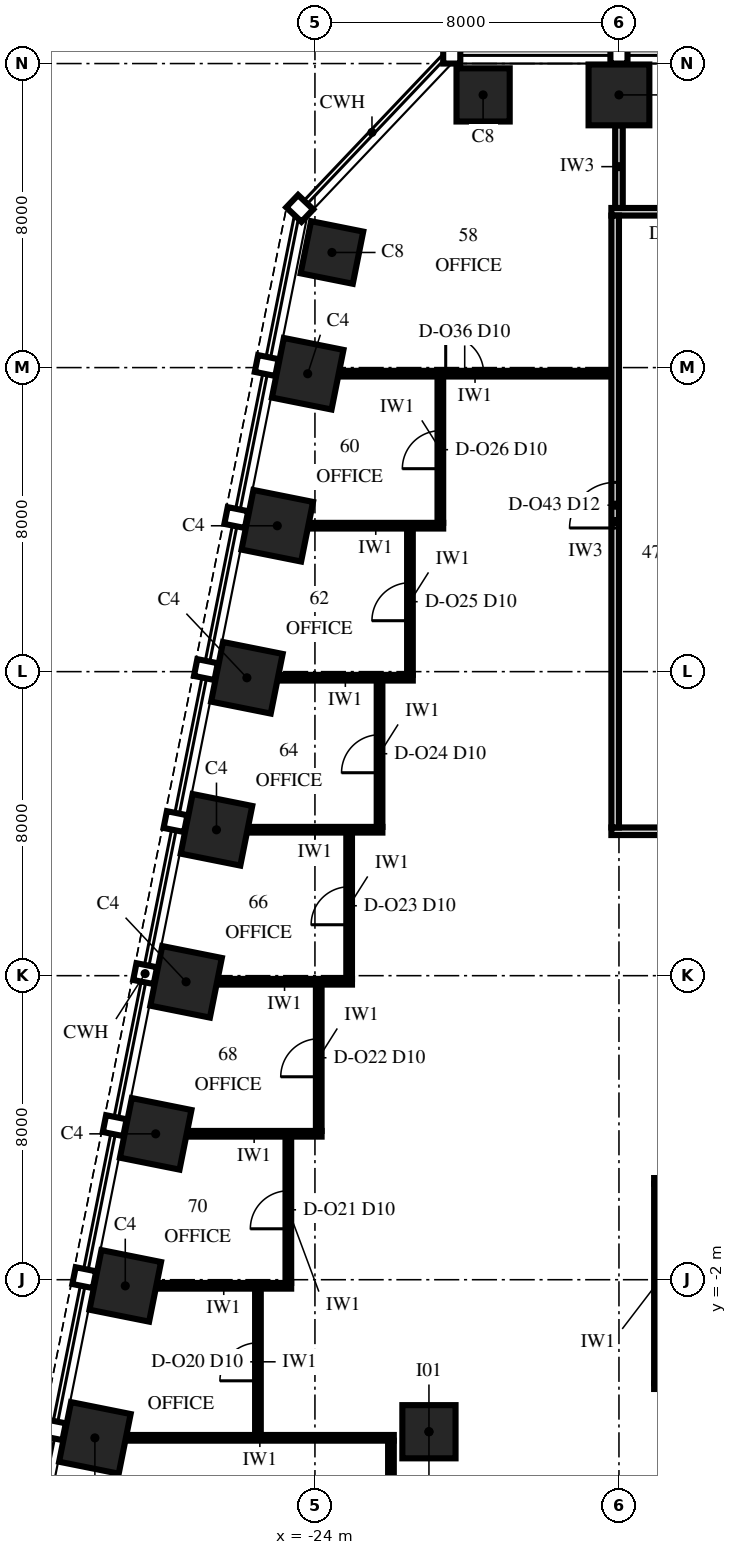
"""IFC4 building model, lengths in metres.
Left out: names, types, materials, properties, quantities, classifications, styles, units other than length and angle.
Written with IfcOpenShell. Run it as: python <this file> out.ifc"""

import sys

from ifc_helpers import new_model, si_unit, direction, frame, frame_2d, origin, origin_2d, place, context, subcontext, project, spatial, rectangle, extrude, element, fill, save


model = new_model("IFC4")
c1 = context("Model", 3, precision=1e-05, world=origin(), true_north=direction((0.0, 1.0)))
c2 = subcontext(c1, "Body", "Model", "MODEL_VIEW")
j1 = project(units=[si_unit("LENGTHUNIT", "METRE"), si_unit("PLANEANGLEUNIT", "RADIAN")], contexts=[c1])
p1 = place(None, origin())
s1 = spatial("IfcSite", under=j1, at=p1, CompositionType="ELEMENT")
p2 = place(p1, origin())
s2 = spatial("IfcBuilding", under=s1, at=p2, CompositionType="ELEMENT")
p3 = place(p2, frame((0.0, 0.0, 202.0)))
s3 = spatial("IfcBuildingStorey", under=s2, at=p3, CompositionType="ELEMENT", Elevation=202.0)
p4 = place(p3, frame((-16.0, 29.175, 0.0), z_axis=(0.0, 0.0, 1.0), x_axis=(-1.0, 0.0, 0.0)))
e1 = element("IfcColumn", 1, at=p4, inside=s3, PredefinedType="COLUMN", context=c2, shape_type="SweptSolid", body=[
    extrude(rectangle(XDim=1.6, YDim=1.6, at=origin_2d()), origin(), (0.0, 0.0, 1.0), 4.0),
])
for number, where, z_axis, x_axis in (
    (2, (-19.575, 29.175, 0.0), (0.0, 0.0, 1.0), (-1.0, 0.0, 0.0)),
    (3, (-23.553, 25.029, 0.0), (0.0, 0.0, 1.0), (-0.196, -0.981, 0.0)),
):
    element("IfcColumn", number, at=place(p3, frame(where, z_axis=z_axis, x_axis=x_axis)), inside=s3, PredefinedType="COLUMN", context=c2, shape_type="SweptSolid", body=[
        extrude(rectangle(XDim=1.4, YDim=1.4, at=origin_2d()), origin(), (0.0, 0.0, 1.0), 4.0),
    ])
for number, where, z_axis, x_axis in (
    (4, (-24.191, 21.838, 0.0), (0.0, 0.0, 1.0), (-0.196, -0.981, 0.0)),
    (5, (-24.991, 17.838, 0.0), (0.0, 0.0, 1.0), (-0.196, -0.981, 0.0)),
    (6, (-25.791, 13.838, 0.0), (0.0, 0.0, 1.0), (-0.196, -0.981, 0.0)),
    (7, (-26.591, 9.838, 0.0), (0.0, 0.0, 1.0), (-0.196, -0.981, 0.0)),
    (8, (-27.391, 5.838, 0.0), (0.0, 0.0, 1.0), (-0.196, -0.981, 0.0)),
    (9, (-28.191, 1.838, 0.0), (0.0, 0.0, 1.0), (-0.196, -0.981, 0.0)),
    (10, (-28.991, -2.162, 0.0), (0.0, 0.0, 1.0), (-0.196, -0.981, 0.0)),
    (11, (-29.791, -6.162, 0.0), (0.0, 0.0, 1.0), (-0.196, -0.981, 0.0)),
):
    element("IfcColumn", number, at=place(p3, frame(where, z_axis=z_axis, x_axis=x_axis)), inside=s3, PredefinedType="COLUMN", context=c2, shape_type="SweptSolid", body=[
        extrude(rectangle(XDim=1.6, YDim=1.6, at=origin_2d()), origin(), (0.0, 0.0, 1.0), 4.0),
    ])
p5 = place(p3, frame((-21.0, -6.0, 0.0), z_axis=(0.0, 0.0, 1.0), x_axis=(1.0, 0.0, 0.0)))
e12 = element("IfcColumn", 12, at=p5, inside=s3, PredefinedType="COLUMN", context=c2, shape_type="SweptSolid", body=[
    extrude(rectangle(XDim=1.4, YDim=1.4, at=origin_2d()), origin(), (0.0, 0.0, 1.0), 4.0),
])
p6 = place(p3, frame((-28.975, -6.16, 0.0), z_axis=(0.0, 0.0, 1.0), x_axis=(1.0, 0.0, 0.0)))
e13 = element("IfcWall", 13, at=p6, inside=s3, PredefinedType="PARTITIONING", context=c2, shape_type="SweptSolid", body=[
    extrude(rectangle(XDim=7.05, YDim=0.15, at=frame_2d((3.525, 0.0))), origin(), (0.0, 0.0, 1.0), 2.842),
])
p7 = place(p3, frame((-15.075, -4.8, 0.0), z_axis=(0.0, 0.0, 1.0), x_axis=(1.0, 0.0, 0.0)))
e14 = element("IfcWall", 14, at=p7, inside=s3, PredefinedType="PARTITIONING", context=c2, shape_type="SweptSolid", body=[
    extrude(rectangle(XDim=3.075, YDim=0.15, at=frame_2d((1.538, 0.0))), origin(), (0.0, 0.0, 1.0), 3.25),
])
p8 = place(p3, frame((-28.175, -2.16, 0.0), z_axis=(0.0, 0.0, 1.0), x_axis=(1.0, 0.0, 0.0)))
e15 = element("IfcWall", 15, at=p8, inside=s3, PredefinedType="PARTITIONING", context=c2, shape_type="SweptSolid", body=[
    extrude(rectangle(XDim=3.55, YDim=0.15, at=frame_2d((1.775, 0.0))), origin(), (0.0, 0.0, 1.0), 3.25),
])
p9 = place(p3, frame((-15.075, 0.6, 0.0), z_axis=(0.0, 0.0, 1.0), x_axis=(1.0, 0.0, 0.0)))
e16 = element("IfcWall", 16, at=p9, inside=s3, PredefinedType="PARTITIONING", context=c2, shape_type="SweptSolid", body=[
    extrude(rectangle(XDim=3.075, YDim=0.15, at=frame_2d((1.538, 0.0))), origin(), (0.0, 0.0, 1.0), 3.25),
])
p10 = place(p9, frame((1.075, 0.0, 0.0)))
e17 = element("IfcOpeningElement", 17, at=p10, cuts=e16, PredefinedType="OPENING", context=c2, shape_type="SweptSolid", body=[
    extrude(rectangle(XDim=1.0, YDim=2.3, at=frame_2d((0.5, 1.15))), frame((0.0, 0.09, 0.0), z_axis=(0.0, -1.0, 0.0), x_axis=(1.0, 0.0, 0.0)), (0.0, 0.0, 1.0), 0.18),
])
p11 = place(p3, frame((-27.375, 1.84, 0.0), z_axis=(0.0, 0.0, 1.0), x_axis=(1.0, 0.0, 0.0)))
e18 = element("IfcWall", 18, at=p11, inside=s3, PredefinedType="PARTITIONING", context=c2, shape_type="SweptSolid", body=[
    extrude(rectangle(XDim=3.55, YDim=0.15, at=frame_2d((1.775, 0.0))), origin(), (0.0, 0.0, 1.0), 3.25),
])
p12 = place(p3, frame((-26.575, 5.84, 0.0), z_axis=(0.0, 0.0, 1.0), x_axis=(1.0, 0.0, 0.0)))
e19 = element("IfcWall", 19, at=p12, inside=s3, PredefinedType="PARTITIONING", context=c2, shape_type="SweptSolid", body=[
    extrude(rectangle(XDim=3.55, YDim=0.15, at=frame_2d((1.775, 0.0))), origin(), (0.0, 0.0, 1.0), 2.842),
])
p13 = place(p3, frame((-16.2, 9.8, 0.0), z_axis=(0.0, 0.0, 1.0), x_axis=(1.0, 0.0, 0.0)))
e20 = element("IfcWall", 20, at=p13, inside=s3, PredefinedType="PARTITIONING", context=c2, shape_type="SweptSolid", body=[
    extrude(rectangle(XDim=2.02, YDim=0.2, at=frame_2d((1.01, 0.0))), origin(), (0.0, 0.0, 1.0), 3.85),
])
for number, where, z_axis, x_axis in (
    (21, (-25.775, 9.84, 0.0), (0.0, 0.0, 1.0), (1.0, 0.0, 0.0)),
    (22, (-24.975, 13.84, 0.0), (0.0, 0.0, 1.0), (1.0, 0.0, 0.0)),
    (23, (-24.175, 17.84, 0.0), (0.0, 0.0, 1.0), (1.0, 0.0, 0.0)),
):
    element("IfcWall", number, at=place(p3, frame(where, z_axis=z_axis, x_axis=x_axis)), inside=s3, PredefinedType="PARTITIONING", context=c2, shape_type="SweptSolid", body=[
        extrude(rectangle(XDim=3.55, YDim=0.15, at=frame_2d((1.775, 0.0))), origin(), (0.0, 0.0, 1.0), 3.25),
    ])
p14 = place(p3, frame((-23.375, 21.84, 0.0), z_axis=(0.0, 0.0, 1.0), x_axis=(1.0, 0.0, 0.0)))
e24 = element("IfcWall", 24, at=p14, inside=s3, PredefinedType="PARTITIONING", context=c2, shape_type="SweptSolid", body=[
    extrude(rectangle(XDim=7.175, YDim=0.15, at=frame_2d((3.587, 0.0))), origin(), (0.0, 0.0, 1.0), 3.25),
])
p15 = place(p14, frame((2.816, 0.0, 0.0)))
e25 = element("IfcOpeningElement", 25, at=p15, cuts=e24, PredefinedType="OPENING", context=c2, shape_type="SweptSolid", body=[
    extrude(rectangle(XDim=1.0, YDim=2.3, at=frame_2d((0.5, 1.15))), frame((0.0, 0.09, 0.0), z_axis=(0.0, -1.0, 0.0), x_axis=(1.0, 0.0, 0.0)), (0.0, 0.0, 1.0), 0.18),
])
p16 = place(p3, frame((-16.2, 26.1, 0.0), z_axis=(0.0, 0.0, 1.0), x_axis=(1.0, 0.0, 0.0)))
e26 = element("IfcWall", 26, at=p16, inside=s3, PredefinedType="PARTITIONING", context=c2, shape_type="SweptSolid", body=[
    extrude(rectangle(XDim=32.1, YDim=0.2, at=frame_2d((16.05, 0.0))), origin(), (0.0, 0.0, 1.0), 3.4),
])
p17 = place(p16, frame((1.6, 0.0, 0.0)))
e27 = element("IfcOpeningElement", 27, at=p17, cuts=e26, PredefinedType="OPENING", context=c2, shape_type="SweptSolid", body=[
    extrude(rectangle(XDim=1.2, YDim=2.4, at=frame_2d((0.6, 1.2))), frame((0.0, 0.115, 0.0), z_axis=(0.0, -1.0, 0.0), x_axis=(1.0, 0.0, 0.0)), (0.0, 0.0, 1.0), 0.23),
])
p18 = place(p16, frame((5.6, 0.0, 0.0)))
e28 = element("IfcOpeningElement", 28, at=p18, cuts=e26, PredefinedType="OPENING", context=c2, shape_type="SweptSolid", body=[
    extrude(rectangle(XDim=1.2, YDim=2.4, at=frame_2d((0.6, 1.2))), frame((0.0, 0.115, 0.0), z_axis=(0.0, -1.0, 0.0), x_axis=(1.0, 0.0, 0.0)), (0.0, 0.0, 1.0), 0.23),
])
p19 = place(p16, frame((9.6, 0.0, 0.0)))
e29 = element("IfcOpeningElement", 29, at=p19, cuts=e26, PredefinedType="OPENING", context=c2, shape_type="SweptSolid", body=[
    extrude(rectangle(XDim=1.2, YDim=2.4, at=frame_2d((0.6, 1.2))), frame((0.0, 0.115, 0.0), z_axis=(0.0, -1.0, 0.0), x_axis=(1.0, 0.0, 0.0)), (0.0, 0.0, 1.0), 0.23),
])
p20 = place(p16, frame((13.6, 0.0, 0.0)))
e30 = element("IfcOpeningElement", 30, at=p20, cuts=e26, PredefinedType="OPENING", context=c2, shape_type="SweptSolid", body=[
    extrude(rectangle(XDim=1.2, YDim=2.4, at=frame_2d((0.6, 1.2))), frame((0.0, 0.115, 0.0), z_axis=(0.0, -1.0, 0.0), x_axis=(1.0, 0.0, 0.0)), (0.0, 0.0, 1.0), 0.23),
])
p21 = place(p16, frame((17.6, 0.0, 0.0)))
e31 = element("IfcOpeningElement", 31, at=p21, cuts=e26, PredefinedType="OPENING", context=c2, shape_type="SweptSolid", body=[
    extrude(rectangle(XDim=1.2, YDim=2.4, at=frame_2d((0.6, 1.2))), frame((0.0, 0.115, 0.0), z_axis=(0.0, -1.0, 0.0), x_axis=(1.0, 0.0, 0.0)), (0.0, 0.0, 1.0), 0.23),
])
p22 = place(p16, frame((21.6, 0.0, 0.0)))
e32 = element("IfcOpeningElement", 32, at=p22, cuts=e26, PredefinedType="OPENING", context=c2, shape_type="SweptSolid", body=[
    extrude(rectangle(XDim=1.2, YDim=2.4, at=frame_2d((0.6, 1.2))), frame((0.0, 0.115, 0.0), z_axis=(0.0, -1.0, 0.0), x_axis=(1.0, 0.0, 0.0)), (0.0, 0.0, 1.0), 0.23),
])
p23 = place(p16, frame((25.6, 0.0, 0.0)))
e33 = element("IfcOpeningElement", 33, at=p23, cuts=e26, PredefinedType="OPENING", context=c2, shape_type="SweptSolid", body=[
    extrude(rectangle(XDim=1.2, YDim=2.4, at=frame_2d((0.6, 1.2))), frame((0.0, 0.115, 0.0), z_axis=(0.0, -1.0, 0.0), x_axis=(1.0, 0.0, 0.0)), (0.0, 0.0, 1.0), 0.23),
])
p24 = place(p16, frame((29.6, 0.0, 0.0)))
e34 = element("IfcOpeningElement", 34, at=p24, cuts=e26, PredefinedType="OPENING", context=c2, shape_type="SweptSolid", body=[
    extrude(rectangle(XDim=1.2, YDim=2.4, at=frame_2d((0.6, 1.2))), frame((0.0, 0.115, 0.0), z_axis=(0.0, -1.0, 0.0), x_axis=(1.0, 0.0, 0.0)), (0.0, 0.0, 1.0), 0.23),
])
p25 = place(p3, frame((-25.5, -6.085, 0.0), z_axis=(0.0, 0.0, 1.0), x_axis=(0.0, 1.0, 0.0)))
e35 = element("IfcWall", 35, at=p25, inside=s3, PredefinedType="PARTITIONING", context=c2, shape_type="SweptSolid", body=[
    extrude(rectangle(XDim=3.85, YDim=0.15, at=frame_2d((1.925, 0.0))), origin(), (0.0, 0.0, 1.0), 2.842),
])
p26 = place(p25, frame((1.425, 0.0, 0.0)))
e36 = element("IfcOpeningElement", 36, at=p26, cuts=e35, PredefinedType="OPENING", context=c2, shape_type="SweptSolid", body=[
    extrude(rectangle(XDim=1.0, YDim=2.3, at=frame_2d((0.5, 1.15))), frame((0.0, 0.09, 0.0), z_axis=(0.0, -1.0, 0.0), x_axis=(1.0, 0.0, 0.0)), (0.0, 0.0, 1.0), 0.18),
])
p27 = place(p3, frame((-24.7, -2.085, 0.0), z_axis=(0.0, 0.0, 1.0), x_axis=(0.0, 1.0, 0.0)))
e37 = element("IfcWall", 37, at=p27, inside=s3, PredefinedType="PARTITIONING", context=c2, shape_type="SweptSolid", body=[
    extrude(rectangle(XDim=3.85, YDim=0.15, at=frame_2d((1.925, 0.0))), origin(), (0.0, 0.0, 1.0), 3.85),
])
p28 = place(p27, frame((1.425, 0.0, 0.0)))
e38 = element("IfcOpeningElement", 38, at=p28, cuts=e37, PredefinedType="OPENING", context=c2, shape_type="SweptSolid", body=[
    extrude(rectangle(XDim=1.0, YDim=2.3, at=frame_2d((0.5, 1.15))), frame((0.0, 0.09, 0.0), z_axis=(0.0, -1.0, 0.0), x_axis=(1.0, 0.0, 0.0)), (0.0, 0.0, 1.0), 0.18),
])
p29 = place(p3, frame((-23.9, 1.915, 0.0), z_axis=(0.0, 0.0, 1.0), x_axis=(0.0, 1.0, 0.0)))
e39 = element("IfcWall", 39, at=p29, inside=s3, PredefinedType="PARTITIONING", context=c2, shape_type="SweptSolid", body=[
    extrude(rectangle(XDim=3.85, YDim=0.15, at=frame_2d((1.925, 0.0))), origin(), (0.0, 0.0, 1.0), 3.85),
])
p30 = place(p29, frame((1.425, 0.0, 0.0)))
e40 = element("IfcOpeningElement", 40, at=p30, cuts=e39, PredefinedType="OPENING", context=c2, shape_type="SweptSolid", body=[
    extrude(rectangle(XDim=1.0, YDim=2.3, at=frame_2d((0.5, 1.15))), frame((0.0, 0.09, 0.0), z_axis=(0.0, -1.0, 0.0), x_axis=(1.0, 0.0, 0.0)), (0.0, 0.0, 1.0), 0.18),
])
p31 = place(p3, frame((-23.1, 5.915, 0.0), z_axis=(0.0, 0.0, 1.0), x_axis=(0.0, 1.0, 0.0)))
e41 = element("IfcWall", 41, at=p31, inside=s3, PredefinedType="PARTITIONING", context=c2, shape_type="SweptSolid", body=[
    extrude(rectangle(XDim=3.85, YDim=0.15, at=frame_2d((1.925, 0.0))), origin(), (0.0, 0.0, 1.0), 2.842),
])
p32 = place(p31, frame((1.425, 0.0, 0.0)))
e42 = element("IfcOpeningElement", 42, at=p32, cuts=e41, PredefinedType="OPENING", context=c2, shape_type="SweptSolid", body=[
    extrude(rectangle(XDim=1.0, YDim=2.3, at=frame_2d((0.5, 1.15))), frame((0.0, 0.09, 0.0), z_axis=(0.0, -1.0, 0.0), x_axis=(1.0, 0.0, 0.0)), (0.0, 0.0, 1.0), 0.18),
])
p33 = place(p3, frame((-22.3, 9.915, 0.0), z_axis=(0.0, 0.0, 1.0), x_axis=(0.0, 1.0, 0.0)))
e43 = element("IfcWall", 43, at=p33, inside=s3, PredefinedType="PARTITIONING", context=c2, shape_type="SweptSolid", body=[
    extrude(rectangle(XDim=3.85, YDim=0.15, at=frame_2d((1.925, 0.0))), origin(), (0.0, 0.0, 1.0), 3.85),
])
p34 = place(p33, frame((1.425, 0.0, 0.0)))
e44 = element("IfcOpeningElement", 44, at=p34, cuts=e43, PredefinedType="OPENING", context=c2, shape_type="SweptSolid", body=[
    extrude(rectangle(XDim=1.0, YDim=2.3, at=frame_2d((0.5, 1.15))), frame((0.0, 0.09, 0.0), z_axis=(0.0, -1.0, 0.0), x_axis=(1.0, 0.0, 0.0)), (0.0, 0.0, 1.0), 0.18),
])
p35 = place(p3, frame((-22.0, -16.375, 0.0), z_axis=(0.0, 0.0, 1.0), x_axis=(0.0, 1.0, 0.0)))
e45 = element("IfcWall", 45, at=p35, inside=s3, PredefinedType="PARTITIONING", context=c2, shape_type="SweptSolid", body=[
    extrude(rectangle(XDim=10.14, YDim=0.15, at=frame_2d((5.07, 0.0))), origin(), (0.0, 0.0, 1.0), 3.25),
])
p36 = place(p35, frame((5.975, 0.0, 0.0)))
e46 = element("IfcOpeningElement", 46, at=p36, cuts=e45, PredefinedType="OPENING", context=c2, shape_type="SweptSolid", body=[
    extrude(rectangle(XDim=1.8, YDim=2.4, at=frame_2d((0.9, 1.2))), frame((0.0, 0.09, 0.0), z_axis=(0.0, -1.0, 0.0), x_axis=(1.0, 0.0, 0.0)), (0.0, 0.0, 1.0), 0.18),
])
p37 = place(p3, frame((-21.5, 13.915, 0.0), z_axis=(0.0, 0.0, 1.0), x_axis=(0.0, 1.0, 0.0)))
e47 = element("IfcWall", 47, at=p37, inside=s3, PredefinedType="PARTITIONING", context=c2, shape_type="SweptSolid", body=[
    extrude(rectangle(XDim=3.85, YDim=0.15, at=frame_2d((1.925, 0.0))), origin(), (0.0, 0.0, 1.0), 3.25),
])
p38 = place(p37, frame((1.425, 0.0, 0.0)))
e48 = element("IfcOpeningElement", 48, at=p38, cuts=e47, PredefinedType="OPENING", context=c2, shape_type="SweptSolid", body=[
    extrude(rectangle(XDim=1.0, YDim=2.3, at=frame_2d((0.5, 1.15))), frame((0.0, 0.09, 0.0), z_axis=(0.0, -1.0, 0.0), x_axis=(1.0, 0.0, 0.0)), (0.0, 0.0, 1.0), 0.18),
])
p39 = place(p3, frame((-20.7, 17.915, 0.0), z_axis=(0.0, 0.0, 1.0), x_axis=(0.0, 1.0, 0.0)))
e49 = element("IfcWall", 49, at=p39, inside=s3, PredefinedType="PARTITIONING", context=c2, shape_type="SweptSolid", body=[
    extrude(rectangle(XDim=3.85, YDim=0.15, at=frame_2d((1.925, 0.0))), origin(), (0.0, 0.0, 1.0), 3.25),
])
p40 = place(p39, frame((1.425, 0.0, 0.0)))
e50 = element("IfcOpeningElement", 50, at=p40, cuts=e49, PredefinedType="OPENING", context=c2, shape_type="SweptSolid", body=[
    extrude(rectangle(XDim=1.0, YDim=2.3, at=frame_2d((0.5, 1.15))), frame((0.0, 0.09, 0.0), z_axis=(0.0, -1.0, 0.0), x_axis=(1.0, 0.0, 0.0)), (0.0, 0.0, 1.0), 0.18),
])
p41 = place(p3, frame((-16.1, 9.9, 0.0), z_axis=(0.0, 0.0, 1.0), x_axis=(0.0, 1.0, 0.0)))
e51 = element("IfcWall", 51, at=p41, inside=s3, PredefinedType="PARTITIONING", context=c2, shape_type="SweptSolid", body=[
    extrude(rectangle(XDim=16.1, YDim=0.2, at=frame_2d((8.05, 0.0))), origin(), (0.0, 0.0, 1.0), 3.25),
])
p42 = place(p41, frame((7.88, 0.0, 0.0)))
e52 = element("IfcOpeningElement", 52, at=p42, cuts=e51, PredefinedType="OPENING", context=c2, shape_type="SweptSolid", body=[
    extrude(rectangle(XDim=1.2, YDim=2.4, at=frame_2d((0.6, 1.2))), frame((0.0, 0.115, 0.0), z_axis=(0.0, -1.0, 0.0), x_axis=(1.0, 0.0, 0.0)), (0.0, 0.0, 1.0), 0.23),
])
p43 = place(p3, frame((-16.0, 26.2, 0.0), z_axis=(0.0, 0.0, 1.0), x_axis=(0.0, 1.0, 0.0)))
e53 = element("IfcWall", 53, at=p43, inside=s3, PredefinedType="PARTITIONING", context=c2, shape_type="SweptSolid", body=[
    extrude(rectangle(XDim=2.175, YDim=0.2, at=frame_2d((1.087, 0.0))), origin(), (0.0, 0.0, 1.0), 3.4),
])
p44 = place(p3, frame((-15.0, -4.725, 0.0), z_axis=(0.0, 0.0, 1.0), x_axis=(0.0, 1.0, 0.0)))
e54 = element("IfcWall", 54, at=p44, inside=s3, PredefinedType="PARTITIONING", context=c2, shape_type="SweptSolid", body=[
    extrude(rectangle(XDim=5.25, YDim=0.15, at=frame_2d((2.625, 0.0))), origin(), (0.0, 0.0, 1.0), 3.85),
])
p45 = place(p26, origin())
e55 = element("IfcDoor", 55, at=p45, inside=s3, OperationType="SINGLE_SWING_LEFT", PredefinedType="DOOR", context=c2, shape_type="SweptSolid", body=[
    extrude(rectangle(XDim=1.0, YDim=2.3, at=frame_2d((0.5, 1.15))), frame((0.0, 0.075, 0.0), z_axis=(0.0, -1.0, 0.0), x_axis=(1.0, 0.0, 0.0)), (0.0, 0.0, 1.0), 0.149),
])
fill(e36, e55)
p46 = place(p28, origin())
e56 = element("IfcDoor", 56, at=p46, inside=s3, OperationType="SINGLE_SWING_LEFT", PredefinedType="DOOR", context=c2, shape_type="SweptSolid", body=[
    extrude(rectangle(XDim=1.0, YDim=2.3, at=frame_2d((0.5, 1.15))), frame((0.0, 0.075, 0.0), z_axis=(0.0, -1.0, 0.0), x_axis=(1.0, 0.0, 0.0)), (0.0, 0.0, 1.0), 0.149),
])
fill(e38, e56)
p47 = place(p30, origin())
e57 = element("IfcDoor", 57, at=p47, inside=s3, OperationType="SINGLE_SWING_LEFT", PredefinedType="DOOR", context=c2, shape_type="SweptSolid", body=[
    extrude(rectangle(XDim=1.0, YDim=2.3, at=frame_2d((0.5, 1.15))), frame((0.0, 0.075, 0.0), z_axis=(0.0, -1.0, 0.0), x_axis=(1.0, 0.0, 0.0)), (0.0, 0.0, 1.0), 0.149),
])
fill(e40, e57)
p48 = place(p32, origin())
e58 = element("IfcDoor", 58, at=p48, inside=s3, OperationType="SINGLE_SWING_LEFT", PredefinedType="DOOR", context=c2, shape_type="SweptSolid", body=[
    extrude(rectangle(XDim=1.0, YDim=2.3, at=frame_2d((0.5, 1.15))), frame((0.0, 0.075, 0.0), z_axis=(0.0, -1.0, 0.0), x_axis=(1.0, 0.0, 0.0)), (0.0, 0.0, 1.0), 0.149),
])
fill(e42, e58)
p49 = place(p34, origin())
e59 = element("IfcDoor", 59, at=p49, inside=s3, OperationType="SINGLE_SWING_LEFT", PredefinedType="DOOR", context=c2, shape_type="SweptSolid", body=[
    extrude(rectangle(XDim=1.0, YDim=2.3, at=frame_2d((0.5, 1.15))), frame((0.0, 0.075, 0.0), z_axis=(0.0, -1.0, 0.0), x_axis=(1.0, 0.0, 0.0)), (0.0, 0.0, 1.0), 0.149),
])
fill(e44, e59)
p50 = place(p38, origin())
e60 = element("IfcDoor", 60, at=p50, inside=s3, OperationType="SINGLE_SWING_LEFT", PredefinedType="DOOR", context=c2, shape_type="SweptSolid", body=[
    extrude(rectangle(XDim=1.0, YDim=2.3, at=frame_2d((0.5, 1.15))), frame((0.0, 0.075, 0.0), z_axis=(0.0, -1.0, 0.0), x_axis=(1.0, 0.0, 0.0)), (0.0, 0.0, 1.0), 0.149),
])
fill(e48, e60)
p51 = place(p40, origin())
e61 = element("IfcDoor", 61, at=p51, inside=s3, OperationType="SINGLE_SWING_LEFT", PredefinedType="DOOR", context=c2, shape_type="SweptSolid", body=[
    extrude(rectangle(XDim=1.0, YDim=2.3, at=frame_2d((0.5, 1.15))), frame((0.0, 0.075, 0.0), z_axis=(0.0, -1.0, 0.0), x_axis=(1.0, 0.0, 0.0)), (0.0, 0.0, 1.0), 0.149),
])
fill(e50, e61)
p52 = place(p15, origin())
e62 = element("IfcDoor", 62, at=p52, inside=s3, OperationType="SINGLE_SWING_LEFT", PredefinedType="DOOR", context=c2, shape_type="SweptSolid", body=[
    extrude(rectangle(XDim=1.0, YDim=2.3, at=frame_2d((0.5, 1.15))), frame((0.0, 0.075, 0.0), z_axis=(0.0, -1.0, 0.0), x_axis=(1.0, 0.0, 0.0)), (0.0, 0.0, 1.0), 0.149),
])
fill(e25, e62)
p53 = place(p42, origin())
e63 = element("IfcDoor", 63, at=p53, inside=s3, OperationType="SINGLE_SWING_LEFT", PredefinedType="DOOR", context=c2, shape_type="SweptSolid", body=[
    extrude(rectangle(XDim=1.2, YDim=2.4, at=frame_2d((0.6, 1.2))), frame((0.0, 0.1, 0.0), z_axis=(0.0, -1.0, 0.0), x_axis=(1.0, 0.0, 0.0)), (0.0, 0.0, 1.0), 0.199),
])
fill(e52, e63)
save(model, sys.argv[1])
